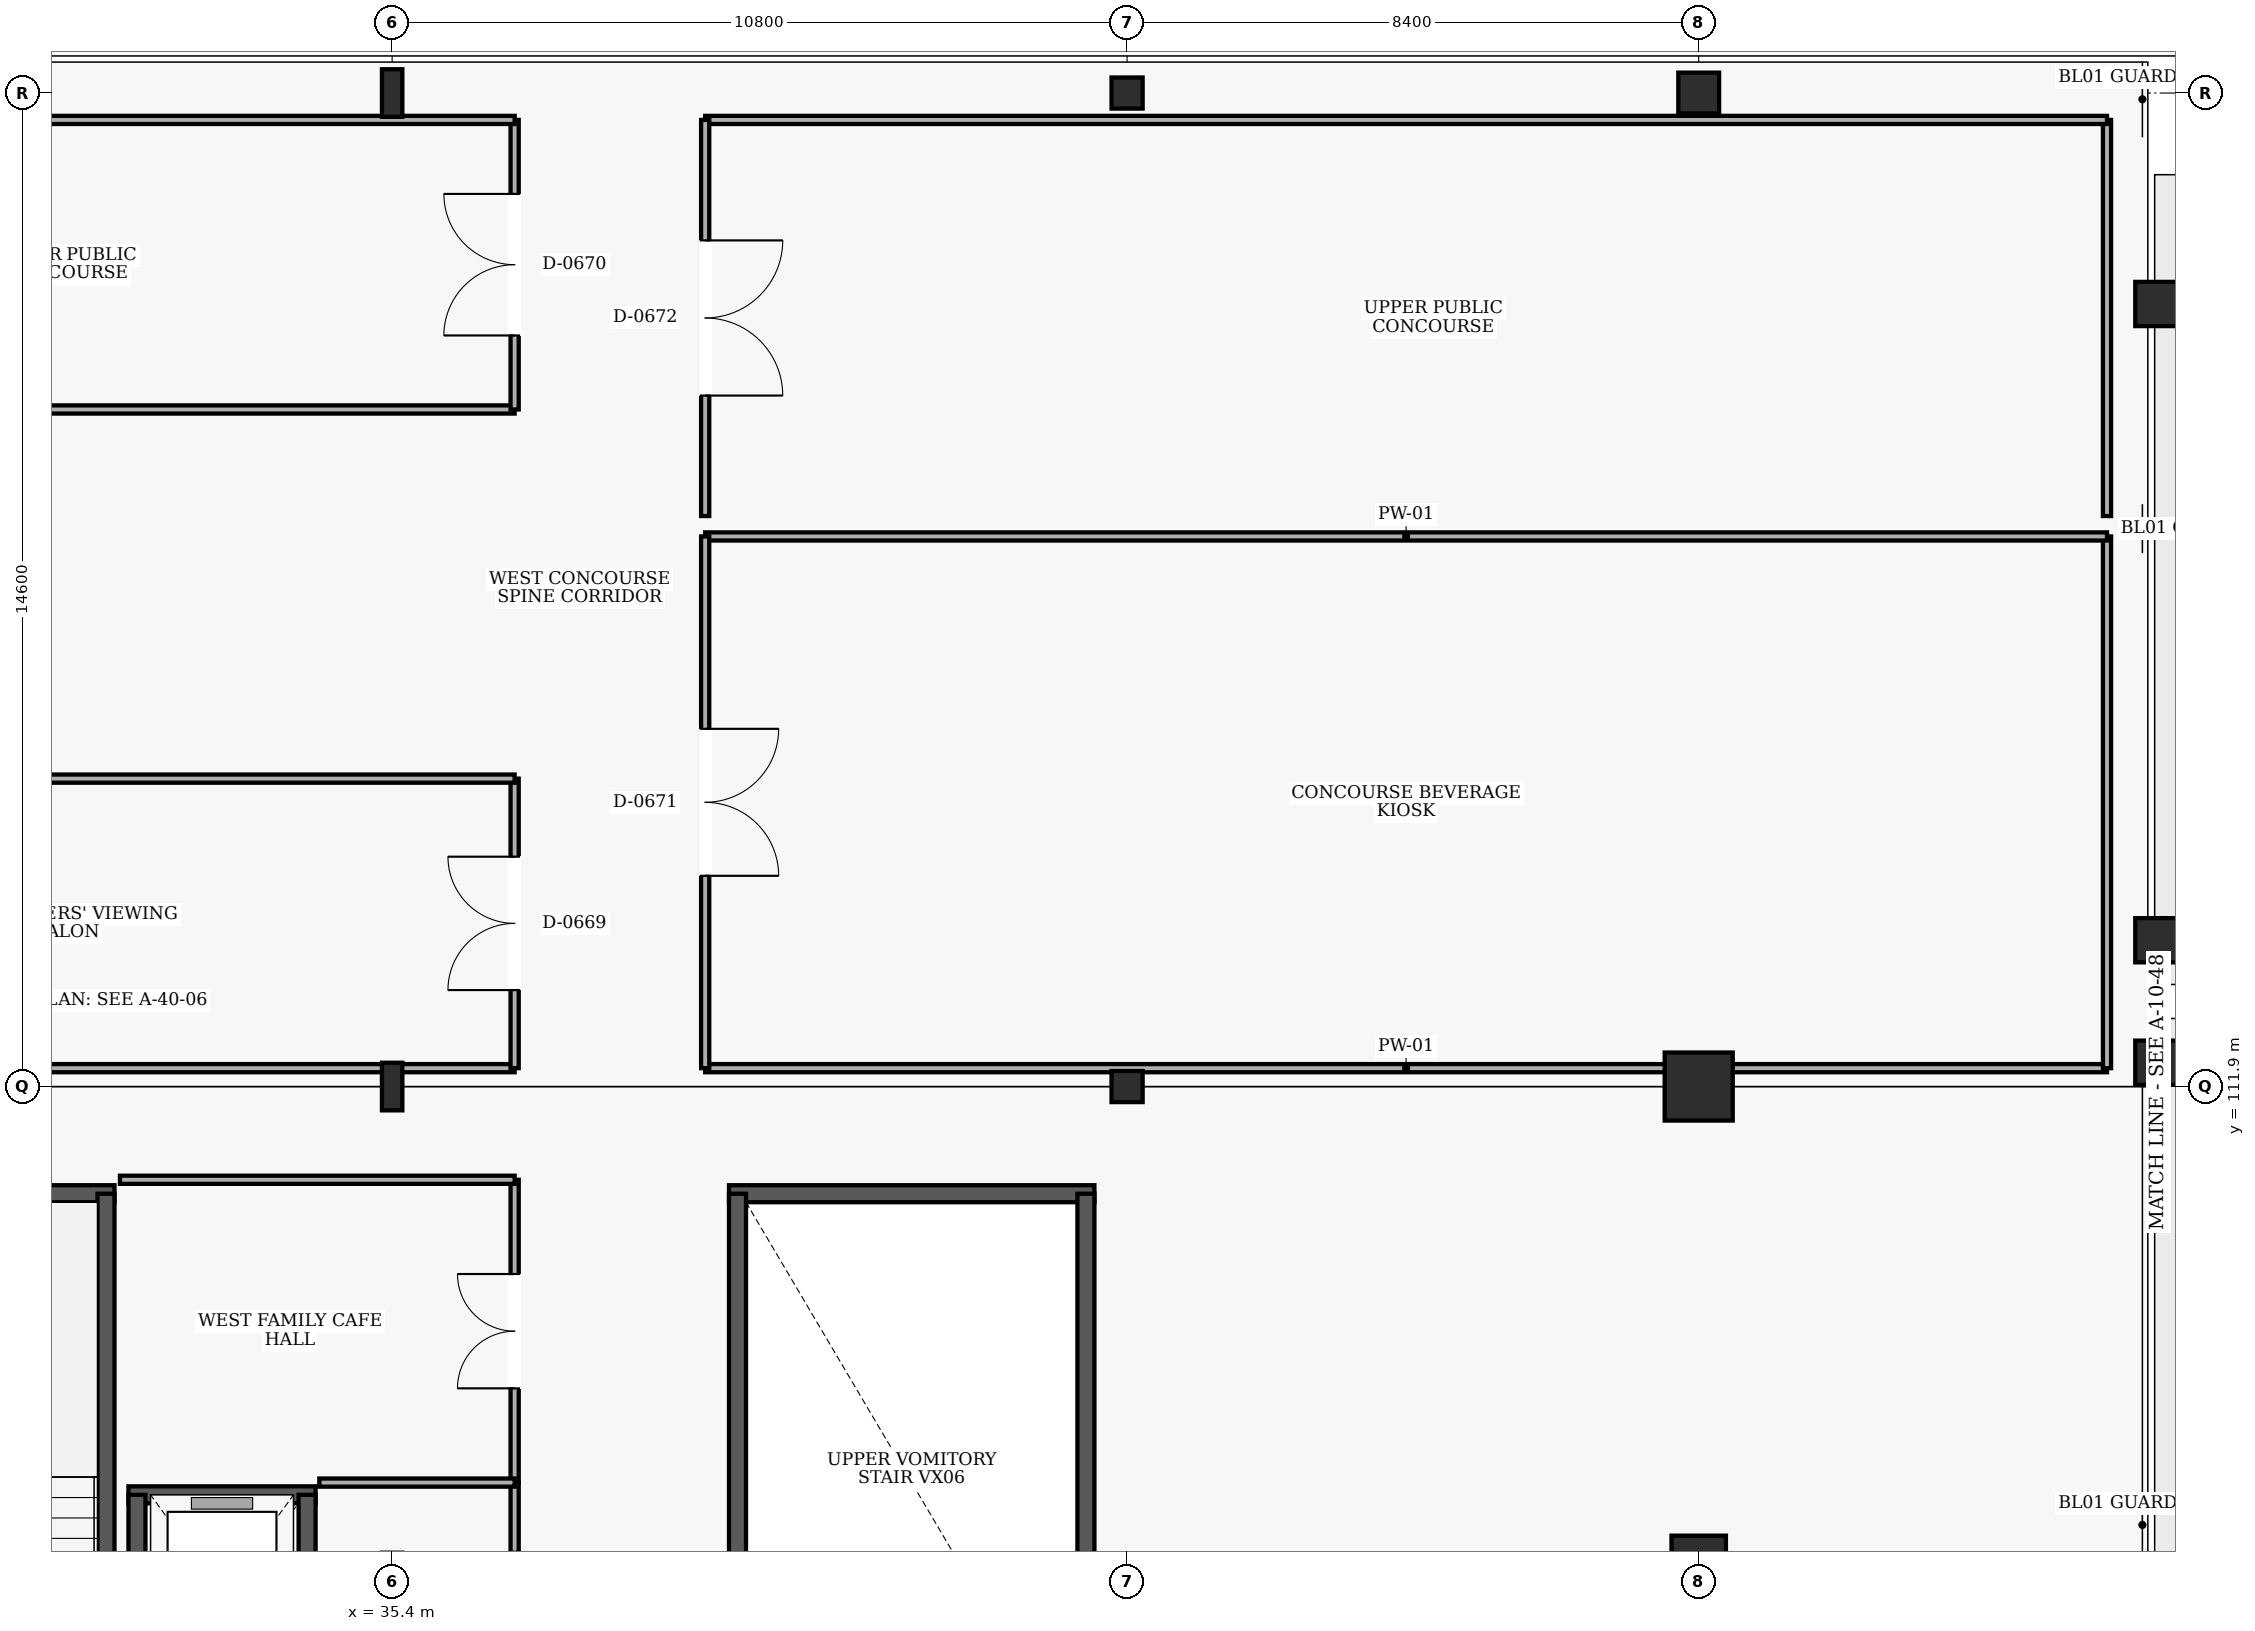
"""IFC4 building model, lengths in metres.
Left out: names, types, materials, properties, quantities, classifications, styles, units other than length and angle.
Written with IfcOpenShell. Run it as: python <this file> out.ifc"""

import sys

from ifc_helpers import new_model, si_unit, direction, frame, frame_2d, origin, origin_2d, place, context, subcontext, project, spatial, rectangle, hollow_circle, i_section, extrude, element, fill, save


model = new_model("IFC4")
c1 = context("Model", 3, precision=1e-05, world=origin(), true_north=direction((0.0, 1.0)))
c2 = subcontext(c1, "Body", "Model", "MODEL_VIEW")
j1 = project(units=[si_unit("LENGTHUNIT", "METRE"), si_unit("PLANEANGLEUNIT", "RADIAN")], contexts=[c1])
p1 = place(None, origin())
s1 = spatial("IfcSite", under=j1, at=p1, CompositionType="ELEMENT")
p2 = place(p1, origin())
s2 = spatial("IfcBuilding", under=s1, at=p2, CompositionType="ELEMENT")
p3 = place(p2, frame((0.0, 0.0, 15.0)))
s3 = spatial("IfcBuildingStorey", under=s2, at=p3, CompositionType="ELEMENT", Elevation=15.0)
for number, where, z_axis, x_axis in (
    (1, (35.4, 111.9, 0.0), (0.0, 0.0, 1.0), (1.0, 0.0, 0.0)),
    (2, (35.4, 126.5, 0.0), (0.0, 0.0, 1.0), (1.0, 0.0, 0.0)),
):
    element("IfcColumn", number, at=place(p3, frame(where, z_axis=z_axis, x_axis=x_axis)), inside=s3, PredefinedType="COLUMN", context=c2, shape_type="SweptSolid", body=[
        extrude(i_section(OverallWidth=0.3, OverallDepth=0.7, WebThickness=0.017, FlangeThickness=0.032, at=origin_2d()), origin(), (0.0, 0.0, 1.0), 4.8),
    ])
for number, where, z_axis, x_axis in (
    (3, (46.2, 111.9, 0.0), (0.0, 0.0, 1.0), (1.0, 0.0, 0.0)),
    (4, (46.2, 126.5, 0.0), (0.0, 0.0, 1.0), (1.0, 0.0, 0.0)),
):
    element("IfcColumn", number, at=place(p3, frame(where, z_axis=z_axis, x_axis=x_axis)), inside=s3, PredefinedType="COLUMN", context=c2, shape_type="SweptSolid", body=[
        extrude(hollow_circle(Radius=0.229, WallThickness=0.02, at=origin_2d()), origin(), (0.0, 0.0, 1.0), 4.8),
    ])
p4 = place(p3, frame((54.6, 104.7, 0.0), z_axis=(0.0, 0.0, 1.0), x_axis=(1.0, 0.0, 0.0)))
e5 = element("IfcColumn", 5, at=p4, inside=s3, PredefinedType="COLUMN", context=c2, shape_type="SweptSolid", body=[
    extrude(rectangle(XDim=0.8, YDim=1.2, at=origin_2d()), origin(), (0.0, 0.0, 1.0), 4.8),
])
p5 = place(p3, frame((54.6, 111.9, 0.0), z_axis=(0.0, 0.0, 1.0), x_axis=(1.0, 0.0, 0.0)))
e6 = element("IfcColumn", 6, at=p5, inside=s3, PredefinedType="COLUMN", context=c2, shape_type="SweptSolid", body=[
    extrude(rectangle(XDim=1.0, YDim=1.0, at=origin_2d()), origin(), (0.0, 0.0, 1.0), 4.8),
])
p6 = place(p3, frame((54.6, 126.5, 0.0), z_axis=(0.0, 0.0, 1.0), x_axis=(1.0, 0.0, 0.0)))
e7 = element("IfcColumn", 7, at=p6, inside=s3, PredefinedType="COLUMN", context=c2, shape_type="SweptSolid", body=[
    extrude(rectangle(XDim=0.6, YDim=0.6, at=origin_2d()), origin(), (0.0, 0.0, 1.0), 4.8),
])
for number, where, z_axis, x_axis in (
    (8, (61.34, 112.25, 0.0), (0.0, 0.0, 1.0), (1.0, 0.0, 0.0)),
    (9, (61.34, 114.05, 0.0), (0.0, 0.0, 1.0), (1.0, 0.0, 0.0)),
    (10, (61.34, 123.4, 0.0), (0.0, 0.0, 1.0), (1.0, 0.0, 0.0)),
):
    element("IfcColumn", number, at=place(p3, frame(where, z_axis=z_axis, x_axis=x_axis)), inside=s3, PredefinedType="COLUMN", context=c2, shape_type="SweptSolid", body=[
        extrude(rectangle(XDim=0.65, YDim=0.65, at=origin_2d()), origin(), (0.0, 0.0, 1.0), 2.188),
    ])
p7 = place(p3, frame((31.32, 110.325, 0.0), z_axis=(0.0, 0.0, 1.0), x_axis=(-1.0, 0.0, 0.0)))
e11 = element("IfcWall", 11, at=p7, inside=s3, PredefinedType="SHEAR", context=c2, shape_type="SweptSolid", body=[
    extrude(rectangle(XDim=5.37, YDim=0.25, at=frame_2d((2.685, 0.0))), origin(), (0.0, 0.0, 1.0), 4.5),
])
p8 = place(p3, frame((31.195, 99.475, 0.0), z_axis=(0.0, 0.0, 1.0), x_axis=(0.0, 1.0, 0.0)))
e12 = element("IfcWall", 12, at=p8, inside=s3, PredefinedType="SHEAR", context=c2, shape_type="SweptSolid", body=[
    extrude(rectangle(XDim=10.85, YDim=0.25, at=frame_2d((5.425, 0.0))), origin(), (0.0, 0.0, 1.0), 4.5),
])
p9 = place(p8, frame((0.52, 0.0, 0.0)))
e13 = element("IfcOpeningElement", 13, at=p9, cuts=e12, PredefinedType="OPENING", context=c2, shape_type="SweptSolid", body=[
    extrude(rectangle(XDim=1.4, YDim=2.15, at=frame_2d((0.7, 1.075))), frame((0.0, 0.135, 0.0), z_axis=(0.0, -1.0, 0.0), x_axis=(1.0, 0.0, 0.0)), (0.0, 0.0, 1.0), 0.27),
])
p10 = place(p3, frame((45.72, 110.325, 0.0), z_axis=(0.0, 0.0, 1.0), x_axis=(-1.0, 0.0, 0.0)))
e14 = element("IfcWall", 14, at=p10, inside=s3, PredefinedType="SHEAR", context=c2, shape_type="SweptSolid", body=[
    extrude(rectangle(XDim=5.37, YDim=0.25, at=frame_2d((2.685, 0.0))), origin(), (0.0, 0.0, 1.0), 4.5),
])
p11 = place(p3, frame((40.475, 99.475, 0.0), z_axis=(0.0, 0.0, 1.0), x_axis=(0.0, 1.0, 0.0)))
e15 = element("IfcWall", 15, at=p11, inside=s3, PredefinedType="SHEAR", context=c2, shape_type="SweptSolid", body=[
    extrude(rectangle(XDim=10.85, YDim=0.25, at=frame_2d((5.425, 0.0))), origin(), (0.0, 0.0, 1.0), 4.5),
])
p12 = place(p11, frame((0.52, 0.0, 0.0)))
e16 = element("IfcOpeningElement", 16, at=p12, cuts=e15, PredefinedType="OPENING", context=c2, shape_type="SweptSolid", body=[
    extrude(rectangle(XDim=1.4, YDim=2.15, at=frame_2d((0.7, 1.075))), frame((0.0, 0.135, 0.0), z_axis=(0.0, -1.0, 0.0), x_axis=(1.0, 0.0, 0.0)), (0.0, 0.0, 1.0), 0.27),
])
p13 = place(p3, frame((45.595, 99.475, 0.0), z_axis=(0.0, 0.0, 1.0), x_axis=(0.0, 1.0, 0.0)))
e17 = element("IfcWall", 17, at=p13, inside=s3, PredefinedType="SHEAR", context=c2, shape_type="SweptSolid", body=[
    extrude(rectangle(XDim=10.85, YDim=0.25, at=frame_2d((5.425, 0.0))), origin(), (0.0, 0.0, 1.0), 4.5),
])
p14 = place(p3, frame((34.275, 105.9, 0.0), z_axis=(0.0, 0.0, 1.0), x_axis=(-1.0, 0.0, 0.0)))
e18 = element("IfcWall", 18, at=p14, inside=s3, PredefinedType="SHEAR", context=c2, shape_type="SweptSolid", body=[
    extrude(rectangle(XDim=2.75, YDim=0.25, at=frame_2d((1.375, 0.0))), origin(), (0.0, 0.0, 1.0), 4.5),
])
for number, where, z_axis, x_axis in (
    (19, (31.65, 105.9, 0.0), (0.0, 0.0, 1.0), (0.0, -1.0, 0.0)),
    (20, (34.15, 103.0, 0.0), (0.0, 0.0, 1.0), (0.0, 1.0, 0.0)),
):
    element("IfcWall", number, at=place(p3, frame(where, z_axis=z_axis, x_axis=x_axis)), inside=s3, PredefinedType="SHEAR", context=c2, shape_type="SweptSolid", body=[
        extrude(rectangle(XDim=2.9, YDim=0.25, at=frame_2d((1.45, 0.0))), origin(), (0.0, 0.0, 1.0), 4.5),
    ])
p15 = place(p3, frame((37.2, 106.08, 0.0), z_axis=(0.0, 0.0, 1.0), x_axis=(0.0, 1.0, 0.0)))
e21 = element("IfcWall", 21, at=p15, inside=s3, PredefinedType="PARTITIONING", context=c2, shape_type="SweptSolid", body=[
    extrude(rectangle(XDim=4.45, YDim=0.12, at=frame_2d((2.225, 0.0))), origin(), (0.0, 0.0, 1.0), 4.5),
])
p16 = place(p15, frame((1.385, 0.0, 0.0)))
e22 = element("IfcOpeningElement", 22, at=p16, cuts=e21, PredefinedType="OPENING", context=c2, shape_type="SweptSolid", body=[
    extrude(rectangle(XDim=1.68, YDim=2.25, at=frame_2d((0.84, 1.125))), frame((0.0, 0.07, 0.0), z_axis=(0.0, -1.0, 0.0), x_axis=(1.0, 0.0, 0.0)), (0.0, 0.0, 1.0), 0.14),
])
p17 = place(p3, frame((37.2, 110.53, 0.0), z_axis=(0.0, 0.0, 1.0), x_axis=(-1.0, 0.0, 0.0)))
e23 = element("IfcWall", 23, at=p17, inside=s3, PredefinedType="PARTITIONING", context=c2, shape_type="SweptSolid", body=[
    extrude(rectangle(XDim=5.8, YDim=0.12, at=frame_2d((2.9, 0.0))), origin(), (0.0, 0.0, 1.0), 4.5),
])
p18 = place(p3, frame((37.2, 103.13, 0.0), z_axis=(0.0, 0.0, 1.0), x_axis=(0.0, 1.0, 0.0)))
e24 = element("IfcWall", 24, at=p18, inside=s3, PredefinedType="PARTITIONING", context=c2, shape_type="SweptSolid", body=[
    extrude(rectangle(XDim=2.95, YDim=0.12, at=frame_2d((1.475, 0.0))), origin(), (0.0, 0.0, 1.0), 4.5),
])
p19 = place(p18, frame((1.015, 0.0, 0.0)))
e25 = element("IfcOpeningElement", 25, at=p19, cuts=e24, PredefinedType="OPENING", context=c2, shape_type="SweptSolid", body=[
    extrude(rectangle(XDim=0.92, YDim=2.1, at=frame_2d((0.46, 1.05))), frame((0.0, 0.07, 0.0), z_axis=(0.0, -1.0, 0.0), x_axis=(1.0, 0.0, 0.0)), (0.0, 0.0, 1.0), 0.14),
])
p20 = place(p3, frame((37.2, 106.08, 0.0), z_axis=(0.0, 0.0, 1.0), x_axis=(-1.0, 0.0, 0.0)))
e26 = element("IfcWall", 26, at=p20, inside=s3, PredefinedType="PARTITIONING", context=c2, shape_type="SweptSolid", body=[
    extrude(rectangle(XDim=2.87, YDim=0.12, at=frame_2d((1.435, 0.0))), origin(), (0.0, 0.0, 1.0), 4.5),
])
p21 = place(p3, frame((24.845, 112.17, 0.0), z_axis=(0.0, 0.0, 1.0), x_axis=(1.0, 0.0, 0.0)))
e27 = element("IfcWall", 27, at=p21, inside=s3, PredefinedType="PARTITIONING", context=c2, shape_type="SweptSolid", body=[
    extrude(rectangle(XDim=12.355, YDim=0.12, at=frame_2d((6.177, 0.0))), origin(), (0.0, 0.0, 1.0), 3.68),
])
p22 = place(p3, frame((37.2, 112.17, 0.0), z_axis=(0.0, 0.0, 1.0), x_axis=(0.0, 1.0, 0.0)))
e28 = element("IfcWall", 28, at=p22, inside=s3, PredefinedType="PARTITIONING", context=c2, shape_type="SweptSolid", body=[
    extrude(rectangle(XDim=4.255, YDim=0.12, at=frame_2d((2.128, 0.0))), origin(), (0.0, 0.0, 1.0), 4.5),
])
p23 = place(p22, frame((1.148, 0.0, 0.0)))
e29 = element("IfcOpeningElement", 29, at=p23, cuts=e28, PredefinedType="OPENING", context=c2, shape_type="SweptSolid", body=[
    extrude(rectangle(XDim=1.96, YDim=2.3, at=frame_2d((0.98, 1.15))), frame((0.0, 0.07, 0.0), z_axis=(0.0, -1.0, 0.0), x_axis=(1.0, 0.0, 0.0)), (0.0, 0.0, 1.0), 0.14),
])
for number, where, z_axis, x_axis in (
    (30, (37.2, 116.425, 0.0), (0.0, 0.0, 1.0), (-1.0, 0.0, 0.0)),
    (31, (24.845, 121.85, 0.0), (0.0, 0.0, 1.0), (1.0, 0.0, 0.0)),
):
    element("IfcWall", number, at=place(p3, frame(where, z_axis=z_axis, x_axis=x_axis)), inside=s3, PredefinedType="PARTITIONING", context=c2, shape_type="SweptSolid", body=[
        extrude(rectangle(XDim=12.355, YDim=0.12, at=frame_2d((6.177, 0.0))), origin(), (0.0, 0.0, 1.0), 4.5),
    ])
p24 = place(p3, frame((37.2, 121.85, 0.0), z_axis=(0.0, 0.0, 1.0), x_axis=(0.0, 1.0, 0.0)))
e32 = element("IfcWall", 32, at=p24, inside=s3, PredefinedType="PARTITIONING", context=c2, shape_type="SweptSolid", body=[
    extrude(rectangle(XDim=4.255, YDim=0.12, at=frame_2d((2.127, 0.0))), origin(), (0.0, 0.0, 1.0), 4.5),
])
p25 = place(p24, frame((1.088, 0.0, 0.0)))
e33 = element("IfcOpeningElement", 33, at=p25, cuts=e32, PredefinedType="OPENING", context=c2, shape_type="SweptSolid", body=[
    extrude(rectangle(XDim=2.08, YDim=2.35, at=frame_2d((1.04, 1.175))), frame((0.0, 0.07, 0.0), z_axis=(0.0, -1.0, 0.0), x_axis=(1.0, 0.0, 0.0)), (0.0, 0.0, 1.0), 0.14),
])
p26 = place(p3, frame((37.2, 126.105, 0.0), z_axis=(0.0, 0.0, 1.0), x_axis=(-1.0, 0.0, 0.0)))
e34 = element("IfcWall", 34, at=p26, inside=s3, PredefinedType="PARTITIONING", context=c2, shape_type="SweptSolid", body=[
    extrude(rectangle(XDim=12.355, YDim=0.12, at=frame_2d((6.177, 0.0))), origin(), (0.0, 0.0, 1.0), 3.68),
])
p27 = place(p3, frame((40.0, 112.17, 0.0), z_axis=(0.0, 0.0, 1.0), x_axis=(1.0, 0.0, 0.0)))
e35 = element("IfcWall", 35, at=p27, inside=s3, PredefinedType="PARTITIONING", context=c2, shape_type="SweptSolid", body=[
    extrude(rectangle(XDim=20.6, YDim=0.12, at=frame_2d((10.3, 0.0))), origin(), (0.0, 0.0, 1.0), 3.68),
])
p28 = place(p3, frame((60.6, 112.17, 0.0), z_axis=(0.0, 0.0, 1.0), x_axis=(0.0, 1.0, 0.0)))
e36 = element("IfcWall", 36, at=p28, inside=s3, PredefinedType="PARTITIONING", context=c2, shape_type="SweptSolid", body=[
    extrude(rectangle(XDim=7.814, YDim=0.12, at=frame_2d((3.907, 0.0))), origin(), (0.0, 0.0, 1.0), 4.5),
])
p29 = place(p3, frame((60.6, 119.984, 0.0), z_axis=(0.0, 0.0, 1.0), x_axis=(-1.0, 0.0, 0.0)))
e37 = element("IfcWall", 37, at=p29, inside=s3, PredefinedType="PARTITIONING", context=c2, shape_type="SweptSolid", body=[
    extrude(rectangle(XDim=20.6, YDim=0.12, at=frame_2d((10.3, 0.0))), origin(), (0.0, 0.0, 1.0), 4.5),
])
p30 = place(p3, frame((40.0, 119.984, 0.0), z_axis=(0.0, 0.0, 1.0), x_axis=(0.0, -1.0, 0.0)))
e38 = element("IfcWall", 38, at=p30, inside=s3, PredefinedType="PARTITIONING", context=c2, shape_type="SweptSolid", body=[
    extrude(rectangle(XDim=7.814, YDim=0.12, at=frame_2d((3.907, 0.0))), origin(), (0.0, 0.0, 1.0), 4.5),
])
p31 = place(p30, frame((2.827, 0.0, 0.0)))
e39 = element("IfcOpeningElement", 39, at=p31, cuts=e38, PredefinedType="OPENING", context=c2, shape_type="SweptSolid", body=[
    extrude(rectangle(XDim=2.16, YDim=2.35, at=frame_2d((1.08, 1.175))), frame((0.0, 0.07, 0.0), z_axis=(0.0, -1.0, 0.0), x_axis=(1.0, 0.0, 0.0)), (0.0, 0.0, 1.0), 0.14),
])
p32 = place(p3, frame((60.6, 120.284, 0.0), z_axis=(0.0, 0.0, 1.0), x_axis=(0.0, 1.0, 0.0)))
e40 = element("IfcWall", 40, at=p32, inside=s3, PredefinedType="PARTITIONING", context=c2, shape_type="SweptSolid", body=[
    extrude(rectangle(XDim=5.821, YDim=0.12, at=frame_2d((2.911, 0.0))), origin(), (0.0, 0.0, 1.0), 4.5),
])
p33 = place(p3, frame((60.6, 126.105, 0.0), z_axis=(0.0, 0.0, 1.0), x_axis=(-1.0, 0.0, 0.0)))
e41 = element("IfcWall", 41, at=p33, inside=s3, PredefinedType="PARTITIONING", context=c2, shape_type="SweptSolid", body=[
    extrude(rectangle(XDim=20.6, YDim=0.12, at=frame_2d((10.3, 0.0))), origin(), (0.0, 0.0, 1.0), 3.68),
])
p34 = place(p3, frame((40.0, 126.105, 0.0), z_axis=(0.0, 0.0, 1.0), x_axis=(0.0, -1.0, 0.0)))
e42 = element("IfcWall", 42, at=p34, inside=s3, PredefinedType="PARTITIONING", context=c2, shape_type="SweptSolid", body=[
    extrude(rectangle(XDim=5.821, YDim=0.12, at=frame_2d((2.911, 0.0))), origin(), (0.0, 0.0, 1.0), 4.5),
])
p35 = place(p34, frame((1.771, 0.0, 0.0)))
e43 = element("IfcOpeningElement", 43, at=p35, cuts=e42, PredefinedType="OPENING", context=c2, shape_type="SweptSolid", body=[
    extrude(rectangle(XDim=2.28, YDim=2.4, at=frame_2d((1.14, 1.2))), frame((0.0, 0.07, 0.0), z_axis=(0.0, -1.0, 0.0), x_axis=(1.0, 0.0, 0.0)), (0.0, 0.0, 1.0), 0.14),
])
p36 = place(p16, origin())
e44 = element("IfcDoor", 44, at=p36, inside=s3, OperationType="DOUBLE_DOOR_SINGLE_SWING", PredefinedType="DOOR", context=c2, shape_type="SweptSolid", body=[
    extrude(rectangle(XDim=1.68, YDim=2.25, at=frame_2d((0.84, 1.125))), frame((0.0, 0.025, 0.0), z_axis=(0.0, -1.0, 0.0), x_axis=(1.0, 0.0, 0.0)), (0.0, 0.0, 1.0), 0.05),
])
fill(e22, e44)
p37 = place(p23, origin())
e45 = element("IfcDoor", 45, at=p37, inside=s3, OperationType="DOUBLE_DOOR_SINGLE_SWING", PredefinedType="DOOR", context=c2, shape_type="SweptSolid", body=[
    extrude(rectangle(XDim=1.96, YDim=2.3, at=frame_2d((0.98, 1.15))), frame((0.0, 0.025, 0.0), z_axis=(0.0, -1.0, 0.0), x_axis=(1.0, 0.0, 0.0)), (0.0, 0.0, 1.0), 0.05),
])
fill(e29, e45)
p38 = place(p25, origin())
e46 = element("IfcDoor", 46, at=p38, inside=s3, OperationType="DOUBLE_DOOR_SINGLE_SWING", PredefinedType="DOOR", context=c2, shape_type="SweptSolid", body=[
    extrude(rectangle(XDim=2.08, YDim=2.35, at=frame_2d((1.04, 1.175))), frame((0.0, 0.025, 0.0), z_axis=(0.0, -1.0, 0.0), x_axis=(1.0, 0.0, 0.0)), (0.0, 0.0, 1.0), 0.05),
])
fill(e33, e46)
p39 = place(p31, origin())
e47 = element("IfcDoor", 47, at=p39, inside=s3, OperationType="DOUBLE_DOOR_SINGLE_SWING", PredefinedType="DOOR", context=c2, shape_type="SweptSolid", body=[
    extrude(rectangle(XDim=2.16, YDim=2.35, at=frame_2d((1.08, 1.175))), frame((0.0, 0.025, 0.0), z_axis=(0.0, -1.0, 0.0), x_axis=(1.0, 0.0, 0.0)), (0.0, 0.0, 1.0), 0.05),
])
fill(e39, e47)
p40 = place(p35, origin())
e48 = element("IfcDoor", 48, at=p40, inside=s3, OperationType="DOUBLE_DOOR_SINGLE_SWING", PredefinedType="DOOR", context=c2, shape_type="SweptSolid", body=[
    extrude(rectangle(XDim=2.28, YDim=2.4, at=frame_2d((1.14, 1.2))), frame((0.0, 0.025, 0.0), z_axis=(0.0, -1.0, 0.0), x_axis=(1.0, 0.0, 0.0)), (0.0, 0.0, 1.0), 0.05),
])
fill(e43, e48)
save(model, sys.argv[1])
